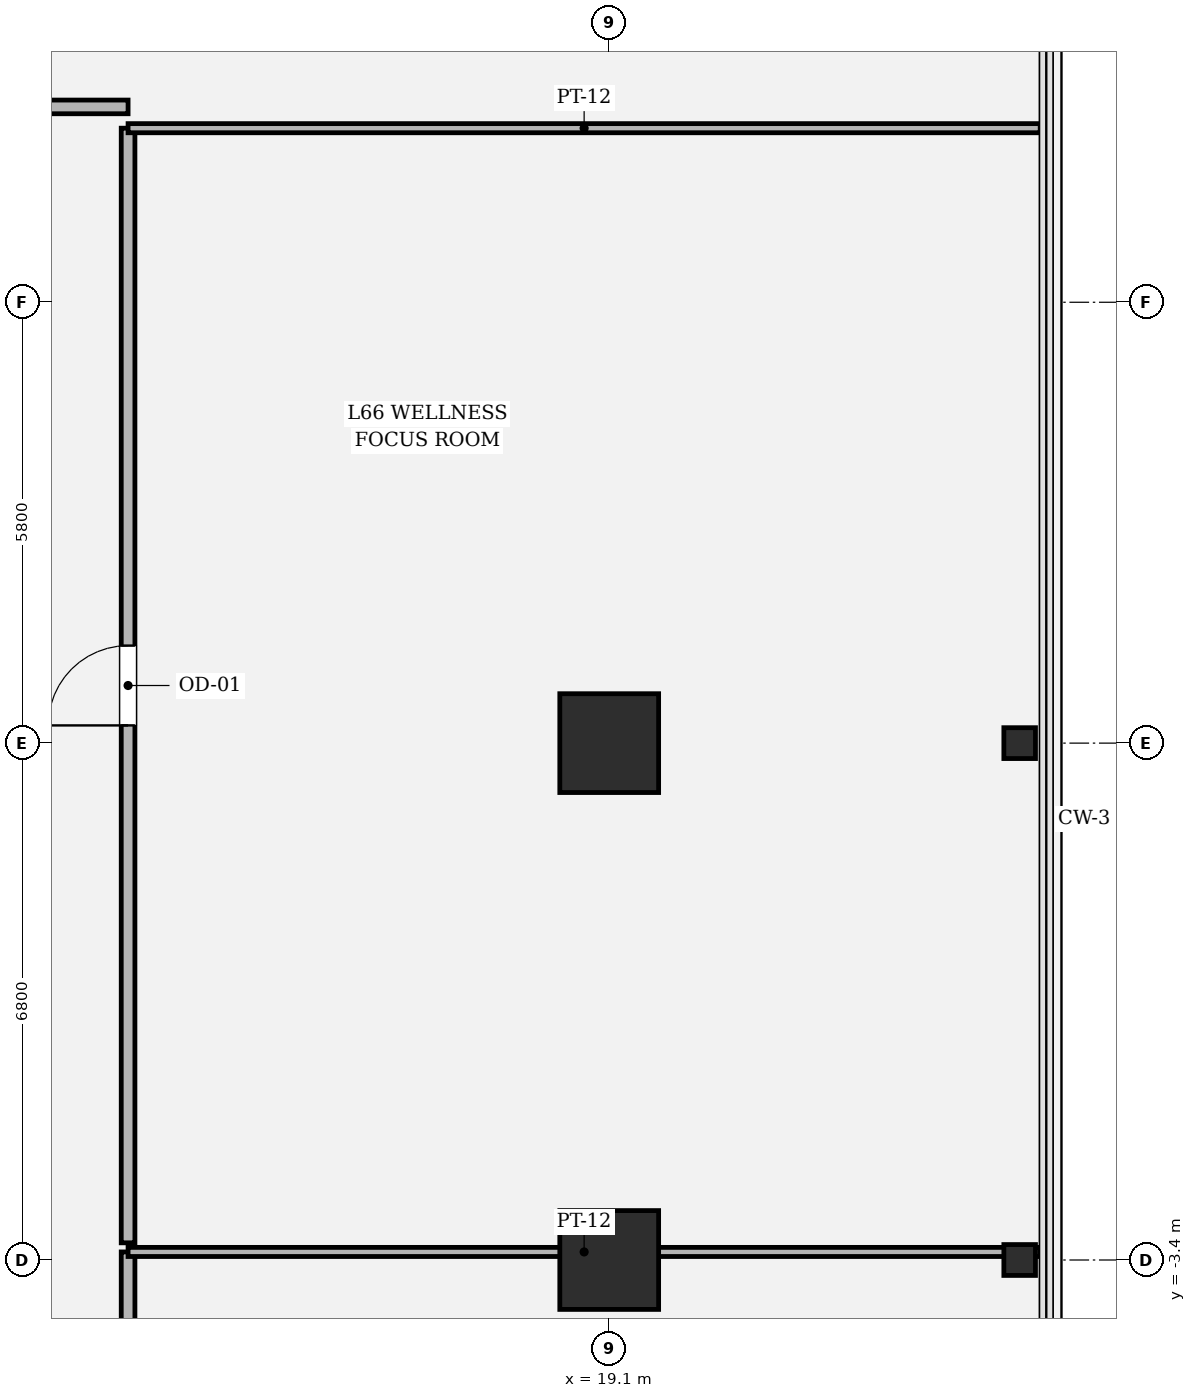
"""IFC4 building model, lengths in metres.
Left out: names, types, materials, properties, quantities, classifications, styles, units other than length and angle.
Written with IfcOpenShell. Run it as: python <this file> out.ifc"""

import sys

from ifc_helpers import new_model, si_unit, direction, frame, frame_2d, origin, origin_2d, place, context, subcontext, project, spatial, rectangle, hollow_rectangle, i_section, extrude, element, fill, save


model = new_model("IFC4")
c1 = context("Model", 3, precision=1e-05, world=origin(), true_north=direction((0.0, 1.0)))
c2 = subcontext(c1, "Body", "Model", "MODEL_VIEW")
j1 = project(units=[si_unit("LENGTHUNIT", "METRE"), si_unit("PLANEANGLEUNIT", "RADIAN")], contexts=[c1])
p1 = place(None, origin())
s1 = spatial("IfcSite", under=j1, at=p1, CompositionType="ELEMENT")
p2 = place(p1, origin())
s2 = spatial("IfcBuilding", under=s1, at=p2, CompositionType="ELEMENT")
p3 = place(p2, frame((0.0, 0.0, 279.75)))
s3 = spatial("IfcBuildingStorey", under=s2, at=p3, CompositionType="ELEMENT", Elevation=279.75)
for number, where, z_axis, x_axis in (
    (1, (19.1, -3.4, 0.0), (0.0, 0.0, 1.0), (1.0, 0.0, 0.0)),
    (2, (19.1, 3.4, 0.0), (0.0, 0.0, 1.0), (1.0, 0.0, 0.0)),
):
    element("IfcColumn", number, at=place(p3, frame(where, z_axis=z_axis, x_axis=x_axis)), inside=s3, PredefinedType="COLUMN", context=c2, shape_type="SweptSolid", body=[
        extrude(hollow_rectangle(XDim=1.3, YDim=1.3, WallThickness=0.038, at=origin_2d()), origin(), (0.0, 0.0, 1.0), 4.05),
    ])
for number, where, z_axis, x_axis in (
    (3, (24.5, -3.4, 0.0), (0.0, 0.0, 1.0), (0.0, 1.0, 0.0)),
    (4, (24.5, 3.4, 0.0), (0.0, 0.0, 1.0), (0.0, 1.0, 0.0)),
):
    element("IfcColumn", number, at=place(p3, frame(where, z_axis=z_axis, x_axis=x_axis)), inside=s3, PredefinedType="COLUMN", context=c2, shape_type="SweptSolid", body=[
        extrude(i_section(OverallWidth=0.406, OverallDepth=0.416, WebThickness=0.029, FlangeThickness=0.048, FilletRadius=0.018, at=origin_2d()), origin(), (0.0, 0.0, 1.0), 4.048),
    ])
p4 = place(p3, frame((12.77, -11.49, 0.0), z_axis=(0.0, 0.0, 1.0), x_axis=(0.0, 1.0, 0.0)))
e5 = element("IfcWall", 5, at=p4, inside=s3, PredefinedType="PARTITIONING", context=c2, shape_type="SweptSolid", body=[
    extrude(rectangle(XDim=8.196, YDim=0.18, at=frame_2d((4.098, 0.0))), origin(), (0.0, 0.0, 1.0), 2.444),
])
p5 = place(p4, frame((3.398, 0.0, 0.0)))
e6 = element("IfcOpeningElement", 6, at=p5, cuts=e5, PredefinedType="OPENING", context=c2, shape_type="SweptSolid", body=[
    extrude(rectangle(XDim=1.4, YDim=2.25, at=frame_2d((0.7, 1.125))), frame((0.0, 0.1, 0.0), z_axis=(0.0, -1.0, 0.0), x_axis=(1.0, 0.0, 0.0)), (0.0, 0.0, 1.0), 0.2),
])
p6 = place(p3, frame((12.77, -3.294, 0.0), z_axis=(0.0, 0.0, 1.0), x_axis=(1.0, 0.0, 0.0)))
e7 = element("IfcWall", 7, at=p6, inside=s3, PredefinedType="PARTITIONING", context=c2, shape_type="SweptSolid", body=[
    extrude(rectangle(XDim=12.0, YDim=0.12, at=frame_2d((6.0, 0.0))), origin(), (0.0, 0.0, 1.0), 2.444),
])
p7 = place(p3, frame((12.77, -3.174, 0.0), z_axis=(0.0, 0.0, 1.0), x_axis=(0.0, 1.0, 0.0)))
e8 = element("IfcWall", 8, at=p7, inside=s3, PredefinedType="PARTITIONING", context=c2, shape_type="SweptSolid", body=[
    extrude(rectangle(XDim=14.664, YDim=0.18, at=frame_2d((7.332, 0.0))), origin(), (0.0, 0.0, 1.0), 2.444),
])
p8 = place(p7, frame((6.807, 0.0, 0.0)))
e9 = element("IfcOpeningElement", 9, at=p8, cuts=e8, PredefinedType="OPENING", context=c2, shape_type="SweptSolid", body=[
    extrude(rectangle(XDim=1.05, YDim=2.2, at=frame_2d((0.525, 1.1))), frame((0.0, 0.1, 0.0), z_axis=(0.0, -1.0, 0.0), x_axis=(1.0, 0.0, 0.0)), (0.0, 0.0, 1.0), 0.2),
])
p9 = place(p3, frame((12.77, 11.49, 0.0), z_axis=(0.0, 0.0, 1.0), x_axis=(1.0, 0.0, 0.0)))
e10 = element("IfcWall", 10, at=p9, inside=s3, PredefinedType="PARTITIONING", context=c2, shape_type="SweptSolid", body=[
    extrude(rectangle(XDim=12.0, YDim=0.12, at=frame_2d((6.0, 0.0))), origin(), (0.0, 0.0, 1.0), 2.444),
])
p10 = place(p3, frame((12.77, 11.77, 0.0), z_axis=(0.0, 0.0, 1.0), x_axis=(-1.0, 0.0, 0.0)))
e11 = element("IfcWall", 11, at=p10, inside=s3, PredefinedType="PARTITIONING", context=c2, shape_type="SweptSolid", body=[
    extrude(rectangle(XDim=2.97, YDim=0.18, at=frame_2d((1.485, 0.0))), origin(), (0.0, 0.0, 1.0), 2.444),
])
p11 = place(p8, origin())
e12 = element("IfcDoor", 12, at=p11, inside=s3, OperationType="SINGLE_SWING_LEFT", PredefinedType="DOOR", context=c2, shape_type="SweptSolid", body=[
    extrude(rectangle(XDim=1.05, YDim=2.2, at=frame_2d((0.525, 1.1))), frame((0.0, 0.025, 0.0), z_axis=(0.0, -1.0, 0.0), x_axis=(1.0, 0.0, 0.0)), (0.0, 0.0, 1.0), 0.05),
])
fill(e9, e12)
save(model, sys.argv[1])
